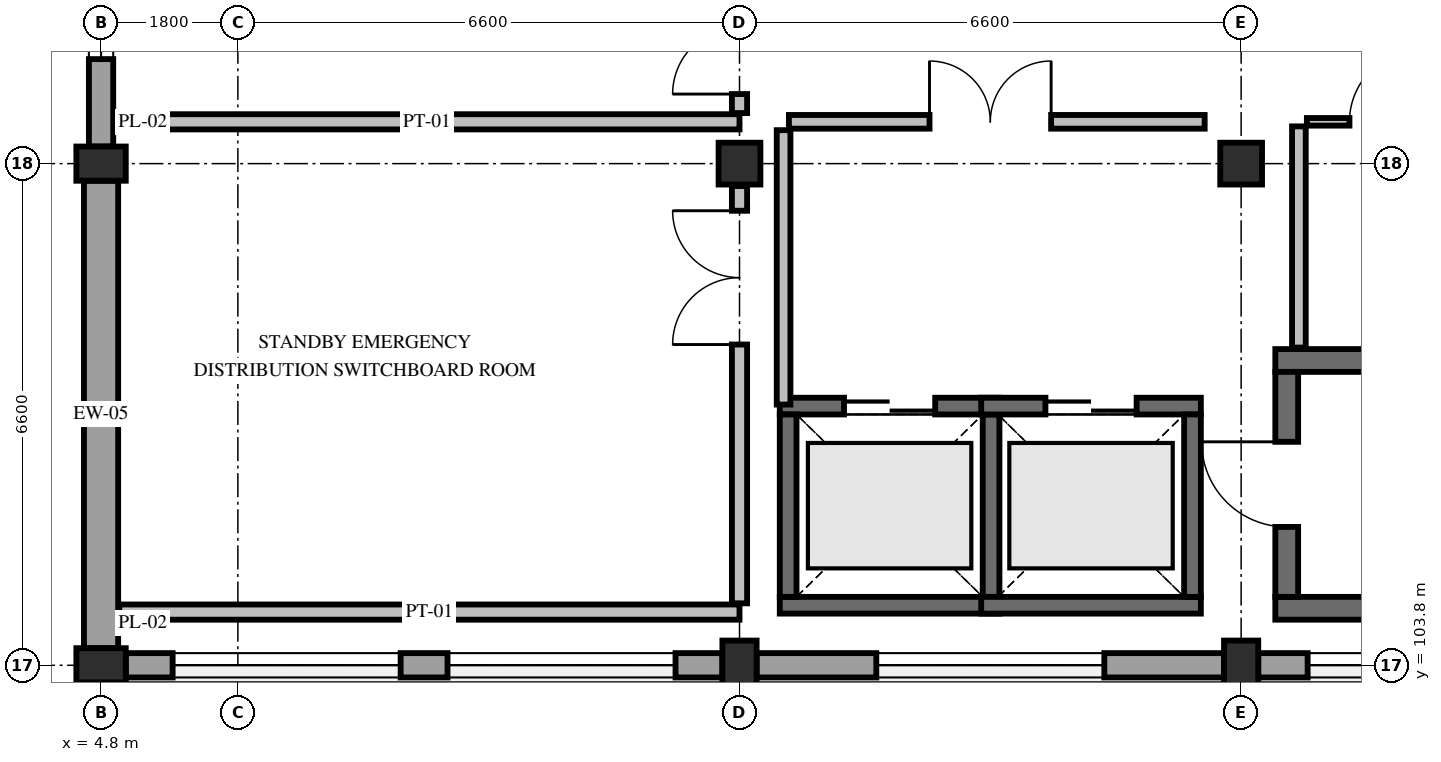
"""IFC4 building model, lengths in metres.
Left out: names, types, materials, properties, quantities, classifications, styles, units other than length and angle.
Written with IfcOpenShell. Run it as: python <this file> out.ifc"""

import sys

from ifc_helpers import new_model, si_unit, direction, frame, frame_2d, origin, origin_2d, place, context, subcontext, project, spatial, rectangle, extrude, element, fill, save


model = new_model("IFC4")
c1 = context("Model", 3, precision=1e-05, world=origin(), true_north=direction((0.0, 1.0)))
c2 = subcontext(c1, "Body", "Model", "MODEL_VIEW")
j1 = project(units=[si_unit("LENGTHUNIT", "METRE"), si_unit("PLANEANGLEUNIT", "RADIAN")], contexts=[c1])
p1 = place(None, origin())
s1 = spatial("IfcSite", under=j1, at=p1, CompositionType="ELEMENT")
p2 = place(p1, origin())
s2 = spatial("IfcBuilding", under=s1, at=p2, CompositionType="ELEMENT")
p3 = place(p2, frame((0.0, 0.0, 46.8)))
s3 = spatial("IfcBuildingStorey", under=s2, at=p3, CompositionType="ELEMENT", Elevation=46.8)
for number, where, z_axis, x_axis in (
    (1, (4.8, 103.8, 0.0), (0.0, 0.0, 1.0), (0.0, 1.0, 0.0)),
    (2, (4.8, 110.4, 0.0), (0.0, 0.0, 1.0), (0.0, 1.0, 0.0)),
    (3, (13.2, 103.8, 0.0), (0.0, 0.0, 1.0), (1.0, 0.0, 0.0)),
):
    element("IfcColumn", number, at=place(p3, frame(where, z_axis=z_axis, x_axis=x_axis)), inside=s3, PredefinedType="PILASTER", context=c2, shape_type="SweptSolid", body=[
        extrude(rectangle(XDim=0.45, YDim=0.65, at=origin_2d()), origin(), (0.0, 0.0, 1.0), 4.2),
    ])
p4 = place(p3, frame((13.2, 110.4, 0.0), z_axis=(0.0, 0.0, 1.0), x_axis=(1.0, 0.0, 0.0)))
e4 = element("IfcColumn", 4, at=p4, inside=s3, PredefinedType="COLUMN", context=c2, shape_type="SweptSolid", body=[
    extrude(rectangle(XDim=0.55, YDim=0.55, at=origin_2d()), origin(), (0.0, 0.0, 1.0), 4.2),
])
p5 = place(p3, frame((19.8, 103.8, 0.0), z_axis=(0.0, 0.0, 1.0), x_axis=(1.0, 0.0, 0.0)))
e5 = element("IfcColumn", 5, at=p5, inside=s3, PredefinedType="PILASTER", context=c2, shape_type="SweptSolid", body=[
    extrude(rectangle(XDim=0.45, YDim=0.65, at=origin_2d()), origin(), (0.0, 0.0, 1.0), 4.2),
])
p6 = place(p3, frame((19.8, 110.4, 0.0), z_axis=(0.0, 0.0, 1.0), x_axis=(1.0, 0.0, 0.0)))
e6 = element("IfcColumn", 6, at=p6, inside=s3, PredefinedType="COLUMN", context=c2, shape_type="SweptSolid", body=[
    extrude(rectangle(XDim=0.55, YDim=0.55, at=origin_2d()), origin(), (0.0, 0.0, 1.0), 4.2),
])
p7 = place(p3, frame((4.8, 104.025, 0.0), z_axis=(0.0, 0.0, 1.0), x_axis=(0.0, 1.0, 0.0)))
e7 = element("IfcWall", 7, at=p7, inside=s3, PredefinedType="SOLIDWALL", context=c2, shape_type="SweptSolid", body=[
    extrude(rectangle(XDim=6.15, YDim=0.45, at=frame_2d((3.075, 0.0))), origin(), (0.0, 0.0, 1.0), 3.23),
])
p8 = place(p3, frame((4.8, 110.625, 0.0), z_axis=(0.0, 0.0, 1.0), x_axis=(0.0, 1.0, 0.0)))
e8 = element("IfcWall", 8, at=p8, inside=s3, PredefinedType="STANDARD", context=c2, shape_type="SweptSolid", body=[
    extrude(rectangle(XDim=6.45, YDim=0.32, at=frame_2d((3.225, 0.0))), origin(), (0.0, 0.0, 1.0), 3.23),
])
p9 = place(p8, frame((1.15, 0.0, 0.85)))
e9 = element("IfcOpeningElement", 9, at=p9, cuts=e8, PredefinedType="OPENING", context=c2, shape_type="SweptSolid", body=[
    extrude(rectangle(XDim=1.5, YDim=2.08, at=frame_2d((0.75, 1.04))), frame((0.0, 0.175, 0.0), z_axis=(0.0, -1.0, 0.0), x_axis=(1.0, 0.0, 0.0)), (0.0, 0.0, 1.0), 0.35),
])
p10 = place(p8, frame((3.8, 0.0, 0.85)))
e10 = element("IfcOpeningElement", 10, at=p10, cuts=e8, PredefinedType="OPENING", context=c2, shape_type="SweptSolid", body=[
    extrude(rectangle(XDim=1.5, YDim=2.08, at=frame_2d((0.75, 1.04))), frame((0.0, 0.175, 0.0), z_axis=(0.0, -1.0, 0.0), x_axis=(1.0, 0.0, 0.0)), (0.0, 0.0, 1.0), 0.35),
])
p11 = place(p3, frame((27.975, 103.8, 0.0), z_axis=(0.0, 0.0, 1.0), x_axis=(-1.0, 0.0, 0.0)))
e11 = element("IfcWall", 11, at=p11, inside=s3, PredefinedType="STANDARD", context=c2, shape_type="SweptSolid", body=[
    extrude(rectangle(XDim=7.95, YDim=0.32, at=frame_2d((3.975, 0.0))), origin(), (0.0, 0.0, 1.0), 3.33),
])
p12 = place(p11, frame((0.65, 0.0, 0.85)))
e12 = element("IfcOpeningElement", 12, at=p12, cuts=e11, PredefinedType="OPENING", context=c2, shape_type="SweptSolid", body=[
    extrude(rectangle(XDim=3.0, YDim=2.08, at=frame_2d((1.5, 1.04))), frame((0.0, 0.175, 0.0), z_axis=(0.0, -1.0, 0.0), x_axis=(1.0, 0.0, 0.0)), (0.0, 0.0, 1.0), 0.35),
])
p13 = place(p11, frame((4.3, 0.0, 0.85)))
e13 = element("IfcOpeningElement", 13, at=p13, cuts=e11, PredefinedType="OPENING", context=c2, shape_type="SweptSolid", body=[
    extrude(rectangle(XDim=3.0, YDim=2.08, at=frame_2d((1.5, 1.04))), frame((0.0, 0.175, 0.0), z_axis=(0.0, -1.0, 0.0), x_axis=(1.0, 0.0, 0.0)), (0.0, 0.0, 1.0), 0.35),
])
p14 = place(p3, frame((19.575, 103.8, 0.0), z_axis=(0.0, 0.0, 1.0), x_axis=(-1.0, 0.0, 0.0)))
e14 = element("IfcWall", 14, at=p14, inside=s3, PredefinedType="STANDARD", context=c2, shape_type="SweptSolid", body=[
    extrude(rectangle(XDim=6.15, YDim=0.32, at=frame_2d((3.075, 0.0))), origin(), (0.0, 0.0, 1.0), 3.33),
])
p15 = place(p14, frame((1.575, 0.0, 0.85)))
e15 = element("IfcOpeningElement", 15, at=p15, cuts=e14, PredefinedType="OPENING", context=c2, shape_type="SweptSolid", body=[
    extrude(rectangle(XDim=3.0, YDim=2.08, at=frame_2d((1.5, 1.04))), frame((0.0, 0.175, 0.0), z_axis=(0.0, -1.0, 0.0), x_axis=(1.0, 0.0, 0.0)), (0.0, 0.0, 1.0), 0.35),
])
p16 = place(p3, frame((12.975, 103.8, 0.0), z_axis=(0.0, 0.0, 1.0), x_axis=(-1.0, 0.0, 0.0)))
e16 = element("IfcWall", 16, at=p16, inside=s3, PredefinedType="STANDARD", context=c2, shape_type="SweptSolid", body=[
    extrude(rectangle(XDim=7.85, YDim=0.32, at=frame_2d((3.925, 0.0))), origin(), (0.0, 0.0, 1.0), 3.33),
])
p17 = place(p16, frame((0.617, 0.0, 0.85)))
e17 = element("IfcOpeningElement", 17, at=p17, cuts=e16, PredefinedType="OPENING", context=c2, shape_type="SweptSolid", body=[
    extrude(rectangle(XDim=3.0, YDim=2.08, at=frame_2d((1.5, 1.04))), frame((0.0, 0.175, 0.0), z_axis=(0.0, -1.0, 0.0), x_axis=(1.0, 0.0, 0.0)), (0.0, 0.0, 1.0), 0.35),
])
p18 = place(p16, frame((4.233, 0.0, 0.85)))
e18 = element("IfcOpeningElement", 18, at=p18, cuts=e16, PredefinedType="OPENING", context=c2, shape_type="SweptSolid", body=[
    extrude(rectangle(XDim=3.0, YDim=2.08, at=frame_2d((1.5, 1.04))), frame((0.0, 0.175, 0.0), z_axis=(0.0, -1.0, 0.0), x_axis=(1.0, 0.0, 0.0)), (0.0, 0.0, 1.0), 0.35),
])
p19 = place(p3, frame((4.89, 99.18, 0.0), z_axis=(0.0, 0.0, 1.0), x_axis=(0.0, 1.0, 0.0)))
e19 = element("IfcWall", 19, at=p19, inside=s3, PredefinedType="PARAPET", context=c2, shape_type="SweptSolid", body=[
    extrude(rectangle(XDim=4.44, YDim=0.18, at=frame_2d((2.22, 0.0))), origin(), (0.0, 0.0, 1.0), 1.12),
])
for number, where, z_axis, x_axis in (
    (20, (20.25, 104.55, 0.0), (0.0, 0.0, 1.0), (1.0, 0.0, 0.0)),
    (21, (20.25, 107.81, 0.0), (0.0, 0.0, 1.0), (1.0, 0.0, 0.0)),
):
    element("IfcWall", number, at=place(p3, frame(where, z_axis=z_axis, x_axis=x_axis)), inside=s3, PredefinedType="SHEAR", context=c2, shape_type="SweptSolid", body=[
        extrude(rectangle(XDim=7.6, YDim=0.3, at=frame_2d((3.8, 0.0))), origin(), (0.0, 0.0, 1.0), 3.94),
    ])
p20 = place(p3, frame((20.4, 104.7, 0.0), z_axis=(0.0, 0.0, 1.0), x_axis=(0.0, 1.0, 0.0)))
e22 = element("IfcWall", 22, at=p20, inside=s3, PredefinedType="SHEAR", context=c2, shape_type="SweptSolid", body=[
    extrude(rectangle(XDim=2.96, YDim=0.3, at=frame_2d((1.48, 0.0))), origin(), (0.0, 0.0, 1.0), 3.94),
])
p21 = place(p20, frame((0.92, 0.0, 0.0)))
e23 = element("IfcOpeningElement", 23, at=p21, cuts=e22, PredefinedType="OPENING", context=c2, shape_type="SweptSolid", body=[
    extrude(rectangle(XDim=1.12, YDim=2.2, at=frame_2d((0.56, 1.1))), frame((0.0, 0.165, 0.0), z_axis=(0.0, -1.0, 0.0), x_axis=(1.0, 0.0, 0.0)), (0.0, 0.0, 1.0), 0.33),
])
p22 = place(p3, frame((13.73, 104.59, 0.0), z_axis=(0.0, 0.0, 1.0), x_axis=(1.0, 0.0, 0.0)))
e24 = element("IfcWall", 24, at=p22, inside=s3, PredefinedType="SHEAR", context=c2, shape_type="SweptSolid", body=[
    extrude(rectangle(XDim=2.89, YDim=0.22, at=frame_2d((1.445, 0.0))), origin(), (0.0, 0.0, 1.0), 3.94),
])
p23 = place(p3, frame((13.73, 107.21, 0.0), z_axis=(0.0, 0.0, 1.0), x_axis=(1.0, 0.0, 0.0)))
e25 = element("IfcWall", 25, at=p23, inside=s3, PredefinedType="SHEAR", context=c2, shape_type="SweptSolid", body=[
    extrude(rectangle(XDim=2.89, YDim=0.22, at=frame_2d((1.445, 0.0))), origin(), (0.0, 0.0, 1.0), 3.94),
])
p24 = place(p23, frame((0.845, 0.0, 0.0)))
e26 = element("IfcOpeningElement", 26, at=p24, cuts=e25, PredefinedType="OPENING", context=c2, shape_type="SweptSolid", body=[
    extrude(rectangle(XDim=1.2, YDim=2.2, at=frame_2d((0.6, 1.1))), frame((0.0, 0.125, 0.0), z_axis=(0.0, -1.0, 0.0), x_axis=(1.0, 0.0, 0.0)), (0.0, 0.0, 1.0), 0.25),
])
for number, where, z_axis, x_axis in (
    (27, (13.84, 104.7, 0.0), (0.0, 0.0, 1.0), (0.0, 1.0, 0.0)),
    (28, (16.51, 104.7, 0.0), (0.0, 0.0, 1.0), (0.0, 1.0, 0.0)),
):
    element("IfcWall", number, at=place(p3, frame(where, z_axis=z_axis, x_axis=x_axis)), inside=s3, PredefinedType="SHEAR", context=c2, shape_type="SweptSolid", body=[
        extrude(rectangle(XDim=2.4, YDim=0.22, at=frame_2d((1.2, 0.0))), origin(), (0.0, 0.0, 1.0), 3.94),
    ])
p25 = place(p3, frame((16.38, 104.59, 0.0), z_axis=(0.0, 0.0, 1.0), x_axis=(1.0, 0.0, 0.0)))
e29 = element("IfcWall", 29, at=p25, inside=s3, PredefinedType="SHEAR", context=c2, shape_type="SweptSolid", body=[
    extrude(rectangle(XDim=2.89, YDim=0.22, at=frame_2d((1.445, 0.0))), origin(), (0.0, 0.0, 1.0), 3.94),
])
p26 = place(p3, frame((16.38, 107.21, 0.0), z_axis=(0.0, 0.0, 1.0), x_axis=(1.0, 0.0, 0.0)))
e30 = element("IfcWall", 30, at=p26, inside=s3, PredefinedType="SHEAR", context=c2, shape_type="SweptSolid", body=[
    extrude(rectangle(XDim=2.89, YDim=0.22, at=frame_2d((1.445, 0.0))), origin(), (0.0, 0.0, 1.0), 3.94),
])
p27 = place(p26, frame((0.845, 0.0, 0.0)))
e31 = element("IfcOpeningElement", 31, at=p27, cuts=e30, PredefinedType="OPENING", context=c2, shape_type="SweptSolid", body=[
    extrude(rectangle(XDim=1.2, YDim=2.2, at=frame_2d((0.6, 1.1))), frame((0.0, 0.125, 0.0), z_axis=(0.0, -1.0, 0.0), x_axis=(1.0, 0.0, 0.0)), (0.0, 0.0, 1.0), 0.25),
])
p28 = place(p3, frame((19.16, 104.7, 0.0), z_axis=(0.0, 0.0, 1.0), x_axis=(0.0, 1.0, 0.0)))
e32 = element("IfcWall", 32, at=p28, inside=s3, PredefinedType="SHEAR", context=c2, shape_type="SweptSolid", body=[
    extrude(rectangle(XDim=2.4, YDim=0.22, at=frame_2d((1.2, 0.0))), origin(), (0.0, 0.0, 1.0), 3.94),
])
p29 = place(p3, frame((13.85, 110.95, 0.0), z_axis=(0.0, 0.0, 1.0), x_axis=(1.0, 0.0, 0.0)))
e33 = element("IfcWall", 33, at=p29, inside=s3, PredefinedType="PARTITIONING", context=c2, shape_type="SweptSolid", body=[
    extrude(rectangle(XDim=5.47, YDim=0.18, at=frame_2d((2.735, 0.0))), origin(), (0.0, 0.0, 1.0), 3.9),
])
p30 = place(p29, frame((1.85, 0.0, 0.0)))
e34 = element("IfcOpeningElement", 34, at=p30, cuts=e33, PredefinedType="OPENING", context=c2, shape_type="SweptSolid", body=[
    extrude(rectangle(XDim=1.6, YDim=2.25, at=frame_2d((0.8, 1.125))), frame((0.0, 0.105, 0.0), z_axis=(0.0, -1.0, 0.0), x_axis=(1.0, 0.0, 0.0)), (0.0, 0.0, 1.0), 0.21),
])
p31 = place(p3, frame((13.78, 107.23, 0.0), z_axis=(0.0, 0.0, 1.0), x_axis=(0.0, 1.0, 0.0)))
e35 = element("IfcWall", 35, at=p31, inside=s3, PredefinedType="PARTITIONING", context=c2, shape_type="SweptSolid", body=[
    extrude(rectangle(XDim=3.61, YDim=0.18, at=frame_2d((1.805, 0.0))), origin(), (0.0, 0.0, 1.0), 3.58),
])
p32 = place(p3, frame((20.56, 107.98, 0.0), z_axis=(0.0, 0.0, 1.0), x_axis=(0.0, 1.0, 0.0)))
e36 = element("IfcWall", 36, at=p32, inside=s3, PredefinedType="PARTITIONING", context=c2, shape_type="SweptSolid", body=[
    extrude(rectangle(XDim=2.91, YDim=0.18, at=frame_2d((1.455, 0.0))), origin(), (0.0, 0.0, 1.0), 3.23),
])
p33 = place(p3, frame((20.665, 110.95, 0.0), z_axis=(0.0, 0.0, 1.0), x_axis=(1.0, 0.0, 0.0)))
e37 = element("IfcWall", 37, at=p33, inside=s3, PredefinedType="PARTITIONING", context=c2, shape_type="SweptSolid", body=[
    extrude(rectangle(XDim=2.085, YDim=0.1, at=frame_2d((1.042, 0.0))), origin(), (0.0, 0.0, 1.0), 3.9),
])
p34 = place(p33, frame((0.56, 0.0, 0.0)))
e38 = element("IfcOpeningElement", 38, at=p34, cuts=e37, PredefinedType="OPENING", context=c2, shape_type="SweptSolid", body=[
    extrude(rectangle(XDim=0.95, YDim=2.15, at=frame_2d((0.475, 1.075))), frame((0.0, 0.065, 0.0), z_axis=(0.0, -1.0, 0.0), x_axis=(1.0, 0.0, 0.0)), (0.0, 0.0, 1.0), 0.13),
])
p35 = place(p3, frame((5.04, 104.5, 0.0), z_axis=(0.0, 0.0, 1.0), x_axis=(1.0, 0.0, 0.0)))
e39 = element("IfcWall", 39, at=p35, inside=s3, PredefinedType="PARTITIONING", context=c2, shape_type="SweptSolid", body=[
    extrude(rectangle(XDim=8.16, YDim=0.2, at=frame_2d((4.08, 0.0))), origin(), (0.0, 0.0, 1.0), 3.53),
])
p36 = place(p3, frame((4.975, 110.95, 0.0), z_axis=(0.0, 0.0, 1.0), x_axis=(1.0, 0.0, 0.0)))
e40 = element("IfcWall", 40, at=p36, inside=s3, PredefinedType="PARTITIONING", context=c2, shape_type="SweptSolid", body=[
    extrude(rectangle(XDim=8.225, YDim=0.2, at=frame_2d((4.112, 0.0))), origin(), (0.0, 0.0, 1.0), 3.48),
])
p37 = place(p3, frame((13.2, 104.615, 0.0), z_axis=(0.0, 0.0, 1.0), x_axis=(0.0, 1.0, 0.0)))
e41 = element("IfcWall", 41, at=p37, inside=s3, PredefinedType="PARTITIONING", context=c2, shape_type="SweptSolid", body=[
    extrude(rectangle(XDim=5.49, YDim=0.2, at=frame_2d((2.745, 0.0))), origin(), (0.0, 0.0, 1.0), 3.53),
])
p38 = place(p37, frame((3.405, 0.0, 0.0)))
e42 = element("IfcOpeningElement", 42, at=p38, cuts=e41, PredefinedType="OPENING", context=c2, shape_type="SweptSolid", body=[
    extrude(rectangle(XDim=1.76, YDim=2.35, at=frame_2d((0.88, 1.175))), frame((0.0, 0.115, 0.0), z_axis=(0.0, -1.0, 0.0), x_axis=(1.0, 0.0, 0.0)), (0.0, 0.0, 1.0), 0.23),
])
p39 = place(p3, frame((13.2, 111.065, 0.0), z_axis=(0.0, 0.0, 1.0), x_axis=(0.0, 1.0, 0.0)))
e43 = element("IfcWall", 43, at=p39, inside=s3, PredefinedType="PARTITIONING", context=c2, shape_type="SweptSolid", body=[
    extrude(rectangle(XDim=5.89, YDim=0.2, at=frame_2d((2.945, 0.0))), origin(), (0.0, 0.0, 1.0), 3.53),
])
p40 = place(p39, frame((0.25, 0.0, 0.0)))
e44 = element("IfcOpeningElement", 44, at=p40, cuts=e43, PredefinedType="OPENING", context=c2, shape_type="SweptSolid", body=[
    extrude(rectangle(XDim=1.76, YDim=2.35, at=frame_2d((0.88, 1.175))), frame((0.0, 0.115, 0.0), z_axis=(0.0, -1.0, 0.0), x_axis=(1.0, 0.0, 0.0)), (0.0, 0.0, 1.0), 0.23),
])
p41 = place(p9, origin())
e45 = element("IfcWindow", 45, at=p41, inside=s3, PartitioningType="SINGLE_PANEL", PredefinedType="WINDOW", context=c2, shape_type="SweptSolid", body=[
    extrude(rectangle(XDim=1.5, YDim=2.08, at=frame_2d((0.75, 1.04))), frame((0.0, 0.03, 0.0), z_axis=(0.0, -1.0, 0.0), x_axis=(1.0, 0.0, 0.0)), (0.0, 0.0, 1.0), 0.06),
])
fill(e9, e45)
p42 = place(p13, origin())
e46 = element("IfcWindow", 46, at=p42, inside=s3, PartitioningType="DOUBLE_PANEL_VERTICAL", PredefinedType="WINDOW", context=c2, shape_type="SweptSolid", body=[
    extrude(rectangle(XDim=3.0, YDim=2.08, at=frame_2d((1.5, 1.04))), frame((0.0, 0.03, 0.0), z_axis=(0.0, -1.0, 0.0), x_axis=(1.0, 0.0, 0.0)), (0.0, 0.0, 1.0), 0.06),
])
fill(e13, e46)
p43 = place(p15, origin())
e47 = element("IfcWindow", 47, at=p43, inside=s3, PartitioningType="DOUBLE_PANEL_VERTICAL", PredefinedType="WINDOW", context=c2, shape_type="SweptSolid", body=[
    extrude(rectangle(XDim=3.0, YDim=2.08, at=frame_2d((1.5, 1.04))), frame((0.0, 0.03, 0.0), z_axis=(0.0, -1.0, 0.0), x_axis=(1.0, 0.0, 0.0)), (0.0, 0.0, 1.0), 0.06),
])
fill(e15, e47)
p44 = place(p17, origin())
e48 = element("IfcWindow", 48, at=p44, inside=s3, PartitioningType="DOUBLE_PANEL_VERTICAL", PredefinedType="WINDOW", context=c2, shape_type="SweptSolid", body=[
    extrude(rectangle(XDim=3.0, YDim=2.08, at=frame_2d((1.5, 1.04))), frame((0.0, 0.03, 0.0), z_axis=(0.0, -1.0, 0.0), x_axis=(1.0, 0.0, 0.0)), (0.0, 0.0, 1.0), 0.06),
])
fill(e17, e48)
p45 = place(p18, origin())
e49 = element("IfcWindow", 49, at=p45, inside=s3, PartitioningType="DOUBLE_PANEL_VERTICAL", PredefinedType="WINDOW", context=c2, shape_type="SweptSolid", body=[
    extrude(rectangle(XDim=3.0, YDim=2.08, at=frame_2d((1.5, 1.04))), frame((0.0, 0.03, 0.0), z_axis=(0.0, -1.0, 0.0), x_axis=(1.0, 0.0, 0.0)), (0.0, 0.0, 1.0), 0.06),
])
fill(e18, e49)
p46 = place(p21, origin())
e50 = element("IfcDoor", 50, at=p46, inside=s3, OperationType="SINGLE_SWING_RIGHT", PredefinedType="DOOR", context=c2, shape_type="SweptSolid", body=[
    extrude(rectangle(XDim=1.12, YDim=2.2, at=frame_2d((0.56, 1.1))), frame((0.0, 0.025, 0.0), z_axis=(0.0, -1.0, 0.0), x_axis=(1.0, 0.0, 0.0)), (0.0, 0.0, 1.0), 0.05),
])
fill(e23, e50)
p47 = place(p24, origin())
e51 = element("IfcDoor", 51, at=p47, inside=s3, OperationType="DOUBLE_DOOR_SLIDING", PredefinedType="DOOR", context=c2, shape_type="SweptSolid", body=[
    extrude(rectangle(XDim=1.2, YDim=2.2, at=frame_2d((0.6, 1.1))), frame((0.0, 0.025, 0.0), z_axis=(0.0, -1.0, 0.0), x_axis=(1.0, 0.0, 0.0)), (0.0, 0.0, 1.0), 0.05),
])
fill(e26, e51)
p48 = place(p27, origin())
e52 = element("IfcDoor", 52, at=p48, inside=s3, OperationType="DOUBLE_DOOR_SLIDING", PredefinedType="DOOR", context=c2, shape_type="SweptSolid", body=[
    extrude(rectangle(XDim=1.2, YDim=2.2, at=frame_2d((0.6, 1.1))), frame((0.0, 0.025, 0.0), z_axis=(0.0, -1.0, 0.0), x_axis=(1.0, 0.0, 0.0)), (0.0, 0.0, 1.0), 0.05),
])
fill(e31, e52)
p49 = place(p30, origin())
e53 = element("IfcDoor", 53, at=p49, inside=s3, OperationType="DOUBLE_DOOR_SINGLE_SWING", PredefinedType="DOOR", context=c2, shape_type="SweptSolid", body=[
    extrude(rectangle(XDim=1.6, YDim=2.25, at=frame_2d((0.8, 1.125))), frame((0.0, 0.025, 0.0), z_axis=(0.0, -1.0, 0.0), x_axis=(1.0, 0.0, 0.0)), (0.0, 0.0, 1.0), 0.05),
])
fill(e34, e53)
p50 = place(p34, origin())
e54 = element("IfcDoor", 54, at=p50, inside=s3, OperationType="SINGLE_SWING_RIGHT", PredefinedType="DOOR", context=c2, shape_type="SweptSolid", body=[
    extrude(rectangle(XDim=0.95, YDim=2.15, at=frame_2d((0.475, 1.075))), frame((0.0, 0.025, 0.0), z_axis=(0.0, -1.0, 0.0), x_axis=(1.0, 0.0, 0.0)), (0.0, 0.0, 1.0), 0.05),
])
fill(e38, e54)
p51 = place(p38, origin())
e55 = element("IfcDoor", 55, at=p51, inside=s3, OperationType="DOUBLE_DOOR_SINGLE_SWING", PredefinedType="DOOR", context=c2, shape_type="SweptSolid", body=[
    extrude(rectangle(XDim=1.76, YDim=2.35, at=frame_2d((0.88, 1.175))), frame((0.0, 0.025, 0.0), z_axis=(0.0, -1.0, 0.0), x_axis=(1.0, 0.0, 0.0)), (0.0, 0.0, 1.0), 0.05),
])
fill(e42, e55)
p52 = place(p40, origin())
e56 = element("IfcDoor", 56, at=p52, inside=s3, OperationType="DOUBLE_DOOR_SINGLE_SWING", PredefinedType="DOOR", context=c2, shape_type="SweptSolid", body=[
    extrude(rectangle(XDim=1.76, YDim=2.35, at=frame_2d((0.88, 1.175))), frame((0.0, 0.025, 0.0), z_axis=(0.0, -1.0, 0.0), x_axis=(1.0, 0.0, 0.0)), (0.0, 0.0, 1.0), 0.05),
])
fill(e44, e56)
save(model, sys.argv[1])
